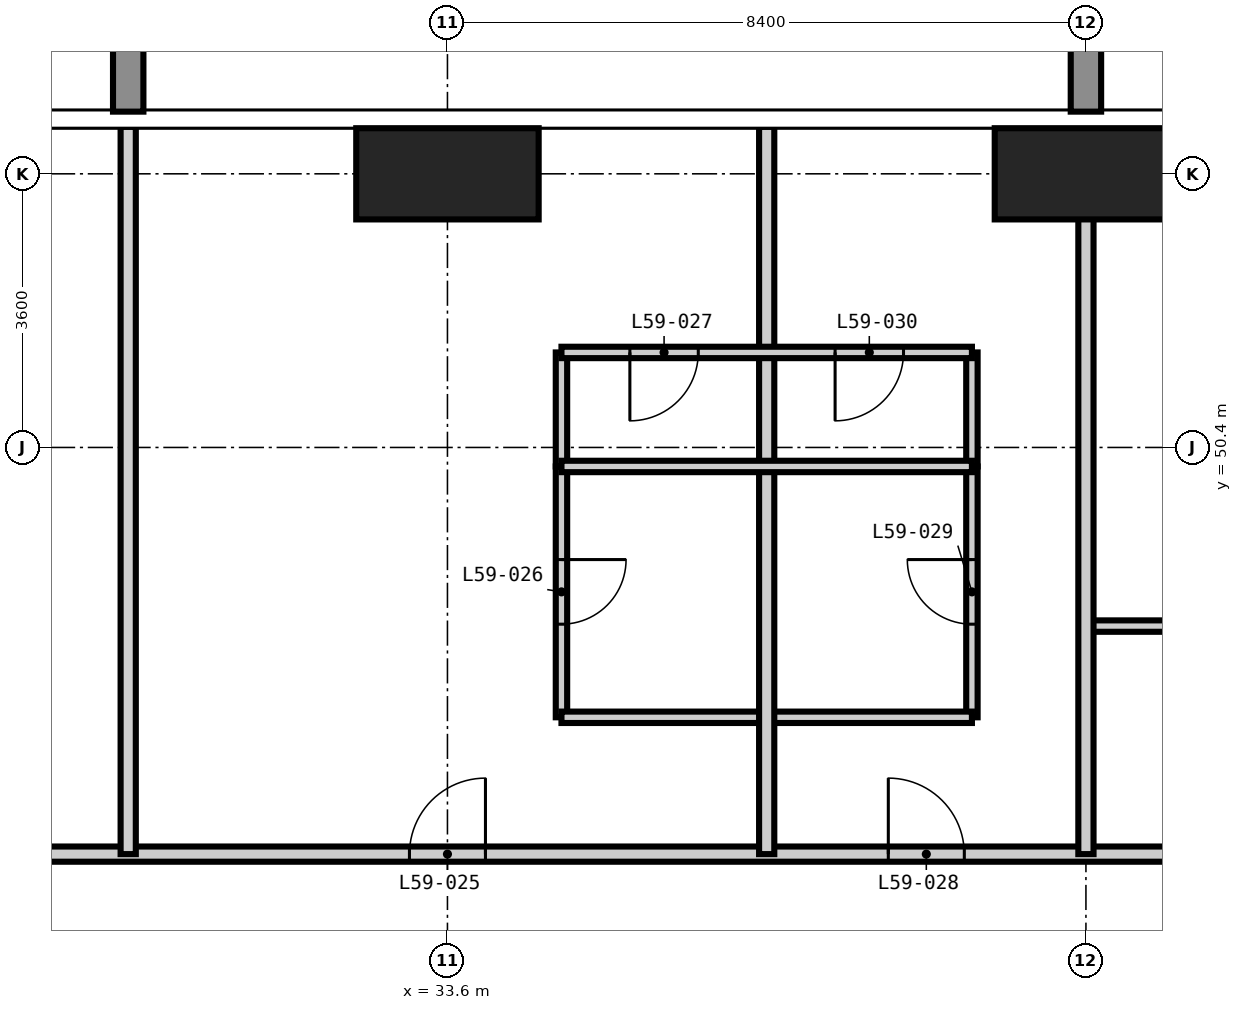
"""IFC4 building model, lengths in metres.
Left out: names, types, materials, properties, quantities, classifications, styles, units other than length and angle.
Written with IfcOpenShell. Run it as: python <this file> out.ifc"""

import sys

from ifc_helpers import new_model, si_unit, direction, frame, frame_2d, origin, origin_2d, place, context, subcontext, project, spatial, rectangle, extrude, element, fill, save


model = new_model("IFC4")
c1 = context("Model", 3, precision=1e-05, world=origin(), true_north=direction((0.0, 1.0)))
c2 = subcontext(c1, "Body", "Model", "MODEL_VIEW")
j1 = project(units=[si_unit("LENGTHUNIT", "METRE"), si_unit("PLANEANGLEUNIT", "RADIAN")], contexts=[c1])
p1 = place(None, origin())
s1 = spatial("IfcSite", under=j1, at=p1, CompositionType="ELEMENT")
p2 = place(p1, origin())
s2 = spatial("IfcBuilding", under=s1, at=p2, CompositionType="ELEMENT")
p3 = place(p2, frame((0.0, 0.0, 229.5)))
s3 = spatial("IfcBuildingStorey", under=s2, at=p3, CompositionType="ELEMENT", Elevation=229.5)
for number, where, z_axis, x_axis in (
    (1, (33.6, 54.0, -0.35), (0.0, 0.0, 1.0), (1.0, 0.0, 0.0)),
    (2, (42.0, 54.0, -0.35), (0.0, 0.0, 1.0), (1.0, 0.0, 0.0)),
):
    element("IfcColumn", number, at=place(p3, frame(where, z_axis=z_axis, x_axis=x_axis)), inside=s3, PredefinedType="COLUMN", context=c2, shape_type="SweptSolid", body=[
        extrude(rectangle(XDim=2.4, YDim=1.2, at=origin_2d()), origin(), (0.0, 0.0, 1.0), 3.9),
    ])
p4 = place(p3, frame((35.1, 46.85, 0.0), z_axis=(0.0, 0.0, 1.0), x_axis=(0.0, 1.0, 0.0)))
e3 = element("IfcWall", 3, at=p4, inside=s3, PredefinedType="PARTITIONING", context=c2, shape_type="SweptSolid", body=[
    extrude(rectangle(XDim=3.3, YDim=0.15, at=frame_2d((1.65, 0.0))), origin(), (0.0, 0.0, 1.0), 3.55),
])
p5 = place(p4, frame((1.225, 0.0, 0.0)))
e4 = element("IfcOpeningElement", 4, at=p5, cuts=e3, PredefinedType="OPENING", context=c2, shape_type="SweptSolid", body=[
    extrude(rectangle(XDim=0.85, YDim=2.1, at=frame_2d((0.425, 1.05))), frame((0.0, 0.085, 0.0), z_axis=(0.0, -1.0, 0.0), x_axis=(1.0, 0.0, 0.0)), (0.0, 0.0, 1.0), 0.17),
])
p6 = place(p3, frame((40.5, 46.85, 0.0), z_axis=(0.0, 0.0, 1.0), x_axis=(0.0, 1.0, 0.0)))
e5 = element("IfcWall", 5, at=p6, inside=s3, PredefinedType="PARTITIONING", context=c2, shape_type="SweptSolid", body=[
    extrude(rectangle(XDim=3.3, YDim=0.15, at=frame_2d((1.65, 0.0))), origin(), (0.0, 0.0, 1.0), 3.55),
])
p7 = place(p6, frame((1.225, 0.0, 0.0)))
e6 = element("IfcOpeningElement", 6, at=p7, cuts=e5, PredefinedType="OPENING", context=c2, shape_type="SweptSolid", body=[
    extrude(rectangle(XDim=0.85, YDim=2.1, at=frame_2d((0.425, 1.05))), frame((0.0, 0.085, 0.0), z_axis=(0.0, -1.0, 0.0), x_axis=(1.0, 0.0, 0.0)), (0.0, 0.0, 1.0), 0.17),
])
p8 = place(p3, frame((35.1, 46.85, 0.0), z_axis=(0.0, 0.0, 1.0), x_axis=(1.0, 0.0, 0.0)))
e7 = element("IfcWall", 7, at=p8, inside=s3, PredefinedType="PARTITIONING", context=c2, shape_type="SweptSolid", body=[
    extrude(rectangle(XDim=5.4, YDim=0.15, at=frame_2d((2.7, 0.0))), origin(), (0.0, 0.0, 1.0), 3.55),
])
p9 = place(p3, frame((42.0, 48.05, 0.0), z_axis=(0.0, 0.0, 1.0), x_axis=(1.0, 0.0, 0.0)))
e8 = element("IfcWall", 8, at=p9, inside=s3, PredefinedType="PARTITIONING", context=c2, shape_type="SweptSolid", body=[
    extrude(rectangle(XDim=2.45, YDim=0.15, at=frame_2d((1.225, 0.0))), origin(), (0.0, 0.0, 1.0), 3.55),
])
p10 = place(p3, frame((21.325, 45.05, 0.0), z_axis=(0.0, 0.0, 1.0), x_axis=(1.0, 0.0, 0.0)))
e9 = element("IfcWall", 9, at=p10, inside=s3, PredefinedType="PARTITIONING", context=c2, shape_type="SweptSolid", body=[
    extrude(rectangle(XDim=23.125, YDim=0.2, at=frame_2d((11.562, 0.0))), origin(), (0.0, 0.0, 1.0), 3.55),
])
p11 = place(p10, frame((5.475, 0.0, 0.0)))
e10 = element("IfcOpeningElement", 10, at=p11, cuts=e9, PredefinedType="OPENING", context=c2, shape_type="SweptSolid", body=[
    extrude(rectangle(XDim=1.0, YDim=2.2, at=frame_2d((0.5, 1.1))), frame((0.0, 0.11, 0.0), z_axis=(0.0, -1.0, 0.0), x_axis=(1.0, 0.0, 0.0)), (0.0, 0.0, 1.0), 0.22),
])
p12 = place(p10, frame((11.775, 0.0, 0.0)))
e11 = element("IfcOpeningElement", 11, at=p12, cuts=e9, PredefinedType="OPENING", context=c2, shape_type="SweptSolid", body=[
    extrude(rectangle(XDim=1.0, YDim=2.2, at=frame_2d((0.5, 1.1))), frame((0.0, 0.11, 0.0), z_axis=(0.0, -1.0, 0.0), x_axis=(1.0, 0.0, 0.0)), (0.0, 0.0, 1.0), 0.22),
])
p13 = place(p10, frame((18.075, 0.0, 0.0)))
e12 = element("IfcOpeningElement", 12, at=p13, cuts=e9, PredefinedType="OPENING", context=c2, shape_type="SweptSolid", body=[
    extrude(rectangle(XDim=1.0, YDim=2.2, at=frame_2d((0.5, 1.1))), frame((0.0, 0.11, 0.0), z_axis=(0.0, -1.0, 0.0), x_axis=(1.0, 0.0, 0.0)), (0.0, 0.0, 1.0), 0.22),
])
for number, where, z_axis, x_axis in (
    (13, (29.4, 45.05, 0.0), (0.0, 0.0, 1.0), (0.0, 1.0, 0.0)),
    (14, (37.8, 45.05, 0.0), (0.0, 0.0, 1.0), (0.0, 1.0, 0.0)),
    (15, (42.0, 45.05, 0.0), (0.0, 0.0, 1.0), (0.0, 1.0, 0.0)),
):
    element("IfcWall", number, at=place(p3, frame(where, z_axis=z_axis, x_axis=x_axis)), inside=s3, PredefinedType="PARTITIONING", context=c2, shape_type="SweptSolid", body=[
        extrude(rectangle(XDim=9.568, YDim=0.2, at=frame_2d((4.784, 0.0))), origin(), (0.0, 0.0, 1.0), 3.55),
    ])
for number, where, z_axis, x_axis in (
    (16, (35.1, 50.15, 0.0), (0.0, 0.0, 1.0), (0.0, 1.0, 0.0)),
    (17, (40.5, 50.15, 0.0), (0.0, 0.0, 1.0), (0.0, 1.0, 0.0)),
):
    element("IfcWall", number, at=place(p3, frame(where, z_axis=z_axis, x_axis=x_axis)), inside=s3, PredefinedType="PARTITIONING", context=c2, shape_type="SweptSolid", body=[
        extrude(rectangle(XDim=1.5, YDim=0.15, at=frame_2d((0.75, 0.0))), origin(), (0.0, 0.0, 1.0), 3.55),
    ])
p14 = place(p3, frame((35.1, 50.15, 0.0), z_axis=(0.0, 0.0, 1.0), x_axis=(1.0, 0.0, 0.0)))
e18 = element("IfcWall", 18, at=p14, inside=s3, PredefinedType="PARTITIONING", context=c2, shape_type="SweptSolid", body=[
    extrude(rectangle(XDim=5.4, YDim=0.15, at=frame_2d((2.7, 0.0))), origin(), (0.0, 0.0, 1.0), 3.55),
])
p15 = place(p3, frame((35.1, 51.65, 0.0), z_axis=(0.0, 0.0, 1.0), x_axis=(1.0, 0.0, 0.0)))
e19 = element("IfcWall", 19, at=p15, inside=s3, PredefinedType="PARTITIONING", context=c2, shape_type="SweptSolid", body=[
    extrude(rectangle(XDim=5.4, YDim=0.15, at=frame_2d((2.7, 0.0))), origin(), (0.0, 0.0, 1.0), 3.55),
])
p16 = place(p15, frame((0.9, 0.0, 0.0)))
e20 = element("IfcOpeningElement", 20, at=p16, cuts=e19, PredefinedType="OPENING", context=c2, shape_type="SweptSolid", body=[
    extrude(rectangle(XDim=0.9, YDim=2.1, at=frame_2d((0.45, 1.05))), frame((0.0, 0.085, 0.0), z_axis=(0.0, -1.0, 0.0), x_axis=(1.0, 0.0, 0.0)), (0.0, 0.0, 1.0), 0.17),
])
p17 = place(p15, frame((3.6, 0.0, 0.0)))
e21 = element("IfcOpeningElement", 21, at=p17, cuts=e19, PredefinedType="OPENING", context=c2, shape_type="SweptSolid", body=[
    extrude(rectangle(XDim=0.9, YDim=2.1, at=frame_2d((0.45, 1.05))), frame((0.0, 0.085, 0.0), z_axis=(0.0, -1.0, 0.0), x_axis=(1.0, 0.0, 0.0)), (0.0, 0.0, 1.0), 0.17),
])
p18 = place(p12, origin())
e22 = element("IfcDoor", 22, at=p18, inside=s3, OperationType="SINGLE_SWING_RIGHT", PredefinedType="DOOR", context=c2, shape_type="SweptSolid", body=[
    extrude(rectangle(XDim=1.0, YDim=2.2, at=frame_2d((0.5, 1.1))), frame((0.0, 0.025, 0.0), z_axis=(0.0, -1.0, 0.0), x_axis=(1.0, 0.0, 0.0)), (0.0, 0.0, 1.0), 0.05),
])
fill(e11, e22)
p19 = place(p5, frame((0.85, 0.0, 0.0), z_axis=(0.0, 0.0, 1.0), x_axis=(-1.0, 0.0, 0.0)))
e23 = element("IfcDoor", 23, at=p19, inside=s3, OperationType="SINGLE_SWING_LEFT", PredefinedType="DOOR", context=c2, shape_type="SweptSolid", body=[
    extrude(rectangle(XDim=0.85, YDim=2.1, at=frame_2d((0.425, 1.05))), frame((0.0, 0.025, 0.0), z_axis=(0.0, -1.0, 0.0), x_axis=(1.0, 0.0, 0.0)), (0.0, 0.0, 1.0), 0.05),
])
fill(e4, e23)
p20 = place(p16, frame((0.9, 0.0, 0.0), z_axis=(0.0, 0.0, 1.0), x_axis=(-1.0, 0.0, 0.0)))
e24 = element("IfcDoor", 24, at=p20, inside=s3, OperationType="SINGLE_SWING_RIGHT", PredefinedType="DOOR", context=c2, shape_type="SweptSolid", body=[
    extrude(rectangle(XDim=0.9, YDim=2.1, at=frame_2d((0.45, 1.05))), frame((0.0, 0.025, 0.0), z_axis=(0.0, -1.0, 0.0), x_axis=(1.0, 0.0, 0.0)), (0.0, 0.0, 1.0), 0.05),
])
fill(e20, e24)
p21 = place(p13, origin())
e25 = element("IfcDoor", 25, at=p21, inside=s3, OperationType="SINGLE_SWING_LEFT", PredefinedType="DOOR", context=c2, shape_type="SweptSolid", body=[
    extrude(rectangle(XDim=1.0, YDim=2.2, at=frame_2d((0.5, 1.1))), frame((0.0, 0.025, 0.0), z_axis=(0.0, -1.0, 0.0), x_axis=(1.0, 0.0, 0.0)), (0.0, 0.0, 1.0), 0.05),
])
fill(e12, e25)
p22 = place(p7, origin())
e26 = element("IfcDoor", 26, at=p22, inside=s3, OperationType="SINGLE_SWING_RIGHT", PredefinedType="DOOR", context=c2, shape_type="SweptSolid", body=[
    extrude(rectangle(XDim=0.85, YDim=2.1, at=frame_2d((0.425, 1.05))), frame((0.0, 0.025, 0.0), z_axis=(0.0, -1.0, 0.0), x_axis=(1.0, 0.0, 0.0)), (0.0, 0.0, 1.0), 0.05),
])
fill(e6, e26)
p23 = place(p17, frame((0.9, 0.0, 0.0), z_axis=(0.0, 0.0, 1.0), x_axis=(-1.0, 0.0, 0.0)))
e27 = element("IfcDoor", 27, at=p23, inside=s3, OperationType="SINGLE_SWING_RIGHT", PredefinedType="DOOR", context=c2, shape_type="SweptSolid", body=[
    extrude(rectangle(XDim=0.9, YDim=2.1, at=frame_2d((0.45, 1.05))), frame((0.0, 0.025, 0.0), z_axis=(0.0, -1.0, 0.0), x_axis=(1.0, 0.0, 0.0)), (0.0, 0.0, 1.0), 0.05),
])
fill(e21, e27)
save(model, sys.argv[1])
